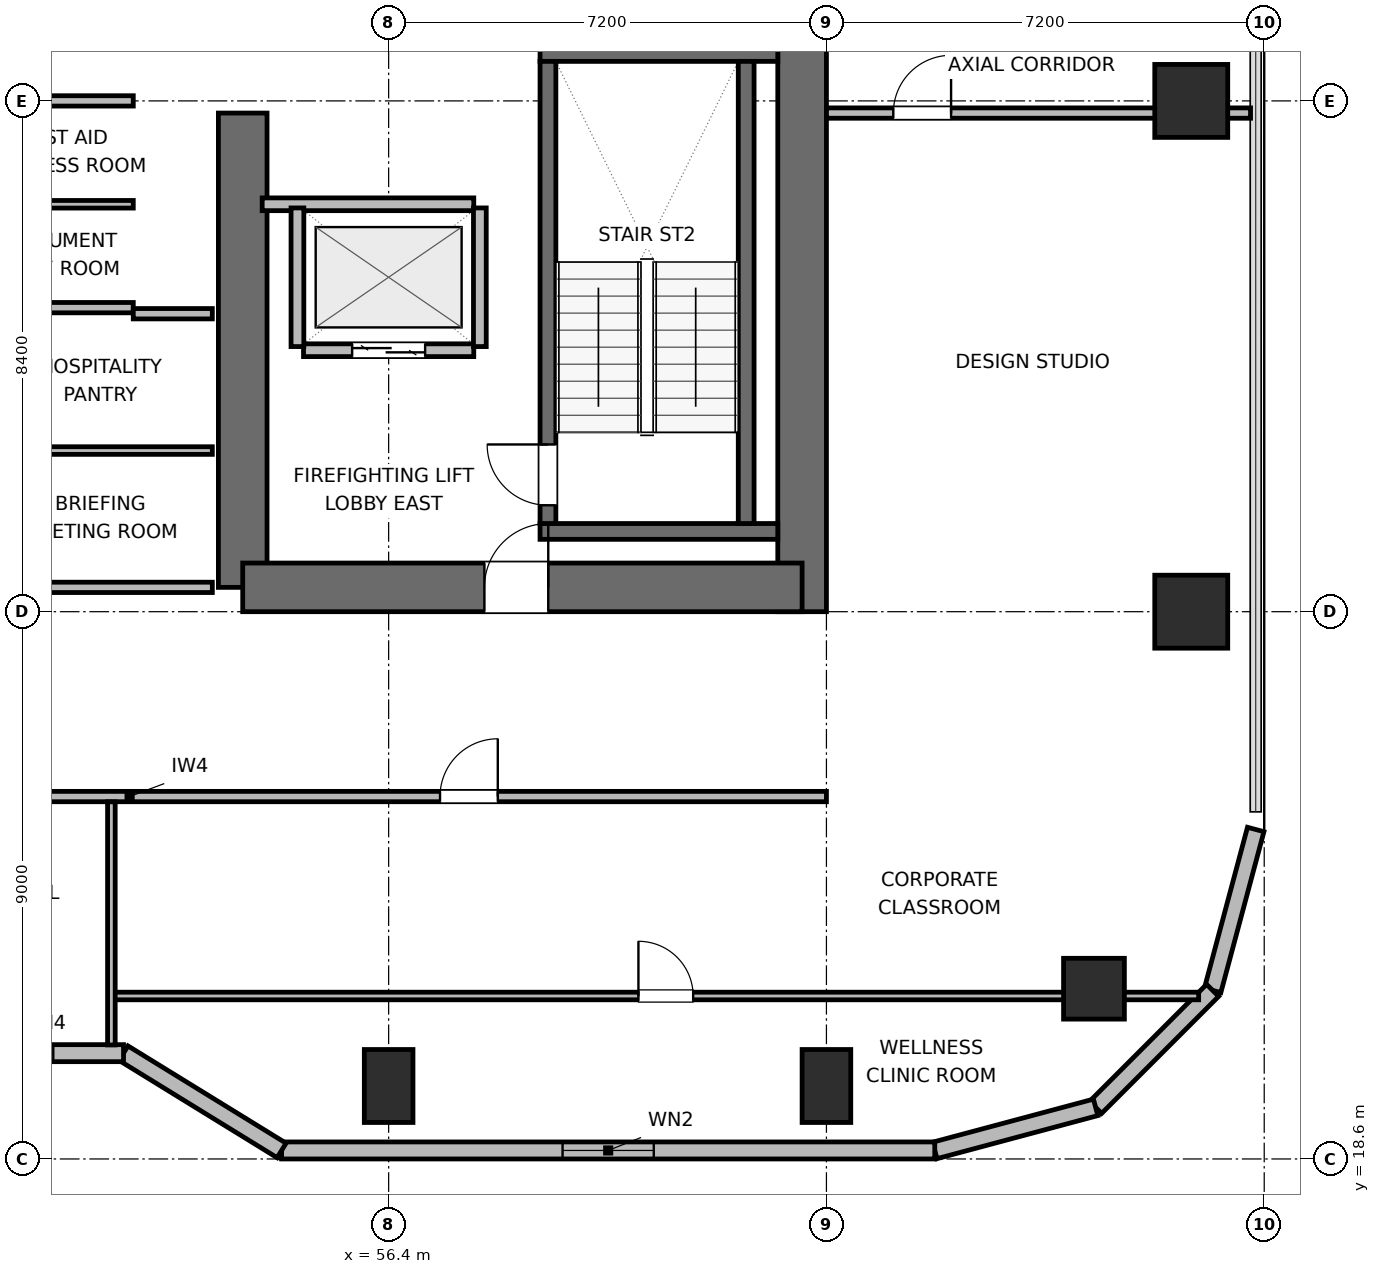
"""IFC4 building model, lengths in metres.
Left out: names, types, materials, properties, quantities, classifications, styles, units other than length and angle.
Written with IfcOpenShell. Run it as: python <this file> out.ifc"""

import sys

from ifc_helpers import new_model, si_unit, direction, frame, frame_2d, origin, origin_2d, place, context, subcontext, project, spatial, rectangle, circle, extrude, element, fill, save


model = new_model("IFC4")
c1 = context("Model", 3, precision=1e-05, world=origin(), true_north=direction((0.0, 1.0)))
c2 = subcontext(c1, "Body", "Model", "MODEL_VIEW")
j1 = project(units=[si_unit("LENGTHUNIT", "METRE"), si_unit("PLANEANGLEUNIT", "RADIAN")], contexts=[c1])
p1 = place(None, origin())
s1 = spatial("IfcSite", under=j1, at=p1, CompositionType="ELEMENT")
p2 = place(p1, origin())
s2 = spatial("IfcBuilding", under=s1, at=p2, CompositionType="ELEMENT")
p3 = place(p2, frame((0.0, 0.0, 177.9)))
s3 = spatial("IfcBuildingStorey", under=s2, at=p3, CompositionType="ELEMENT", Elevation=177.9)
p4 = place(p3, frame((54.0, 28.0, 0.0), z_axis=(0.0, 0.0, 1.0), x_axis=(0.0, 1.0, 0.0)))
e1 = element("IfcWall", 1, at=p4, inside=s3, PredefinedType="SHEAR", context=c2, shape_type="SweptSolid", body=[
    extrude(rectangle(XDim=7.8, YDim=0.8, at=frame_2d((3.9, 0.0))), origin(), (0.0, 0.0, 1.0), 3.9),
])
p5 = place(p3, frame((63.2, 27.6, 0.0), z_axis=(0.0, 0.0, 1.0), x_axis=(0.0, 1.0, 0.0)))
e2 = element("IfcWall", 2, at=p5, inside=s3, PredefinedType="SHEAR", context=c2, shape_type="SweptSolid", body=[
    extrude(rectangle(XDim=16.8, YDim=0.8, at=frame_2d((8.4, 0.0))), origin(), (0.0, 0.0, 1.0), 3.9),
])
p6 = place(p3, frame((54.0, 28.0, 0.0), z_axis=(0.0, 0.0, 1.0), x_axis=(1.0, 0.0, 0.0)))
e3 = element("IfcWall", 3, at=p6, inside=s3, PredefinedType="SHEAR", context=c2, shape_type="SweptSolid", body=[
    extrude(rectangle(XDim=9.2, YDim=0.8, at=frame_2d((4.6, 0.0))), origin(), (0.0, 0.0, 1.0), 3.9),
])
p7 = place(p6, frame((3.975, 0.0, 0.0)))
e4 = element("IfcOpeningElement", 4, at=p7, cuts=e3, PredefinedType="OPENING", context=c2, shape_type="SweptSolid", body=[
    extrude(rectangle(XDim=1.05, YDim=2.04, at=frame_2d((0.525, 1.02))), frame((0.0, 0.41, 0.0), z_axis=(0.0, -1.0, 0.0), x_axis=(1.0, 0.0, 0.0)), (0.0, 0.0, 1.0), 0.82),
])
for number, where, z_axis, x_axis in (
    (5, (58.89, 28.92, 0.0), (0.0, 0.0, 1.0), (1.0, 0.0, 0.0)),
    (6, (58.89, 36.78, 0.0), (0.0, 0.0, 1.0), (1.0, 0.0, 0.0)),
):
    element("IfcWall", number, at=place(p3, frame(where, z_axis=z_axis, x_axis=x_axis)), inside=s3, PredefinedType="SHEAR", context=c2, shape_type="SweptSolid", body=[
        extrude(rectangle(XDim=3.91, YDim=0.26, at=frame_2d((1.955, 0.0))), origin(), (0.0, 0.0, 1.0), 3.9),
    ])
p8 = place(p3, frame((59.02, 29.05, 0.0), z_axis=(0.0, 0.0, 1.0), x_axis=(0.0, 1.0, 0.0)))
e7 = element("IfcWall", 7, at=p8, inside=s3, PredefinedType="SHEAR", context=c2, shape_type="SweptSolid", body=[
    extrude(rectangle(XDim=7.6, YDim=0.26, at=frame_2d((3.8, 0.0))), origin(), (0.0, 0.0, 1.0), 3.9),
])
p9 = place(p8, frame((0.3, 0.0, 0.0)))
e8 = element("IfcOpeningElement", 8, at=p9, cuts=e7, PredefinedType="OPENING", context=c2, shape_type="SweptSolid", body=[
    extrude(rectangle(XDim=1.0, YDim=2.04, at=frame_2d((0.5, 1.02))), frame((0.0, 0.14, 0.0), z_axis=(0.0, -1.0, 0.0), x_axis=(1.0, 0.0, 0.0)), (0.0, 0.0, 1.0), 0.28),
])
p10 = place(p3, frame((62.28, 29.05, 0.0), z_axis=(0.0, 0.0, 1.0), x_axis=(0.0, 1.0, 0.0)))
e9 = element("IfcWall", 9, at=p10, inside=s3, PredefinedType="SHEAR", context=c2, shape_type="SweptSolid", body=[
    extrude(rectangle(XDim=7.6, YDim=0.26, at=frame_2d((3.8, 0.0))), origin(), (0.0, 0.0, 1.0), 3.9),
])
p11 = place(p3, frame((68.0, 21.4, 0.0), z_axis=(0.0, 0.0, 1.0), x_axis=(1.0, 0.0, 0.0)))
e10 = element("IfcColumn", 10, at=p11, inside=s3, PredefinedType="COLUMN", context=c2, shape_type="SweptSolid", body=[
    extrude(circle(Radius=0.5, at=origin_2d()), origin(), (0.0, 0.0, 1.0), 3.9),
])
for number, where, z_axis, x_axis in (
    (11, (56.4, 19.8, 0.0), (0.0, 0.0, 1.0), (1.0, 0.0, 0.0)),
    (12, (63.6, 19.8, 0.0), (0.0, 0.0, 1.0), (1.0, 0.0, 0.0)),
):
    element("IfcColumn", number, at=place(p3, frame(where, z_axis=z_axis, x_axis=x_axis)), inside=s3, PredefinedType="COLUMN", context=c2, shape_type="SweptSolid", body=[
        extrude(rectangle(XDim=0.8, YDim=1.2, at=origin_2d()), origin(), (0.0, 0.0, 1.0), 3.9),
    ])
for number, where, z_axis, x_axis in (
    (13, (69.6, 27.6, 0.0), (0.0, 0.0, 1.0), (1.0, 0.0, 0.0)),
    (14, (69.6, 36.0, 0.0), (0.0, 0.0, 1.0), (1.0, 0.0, 0.0)),
):
    element("IfcColumn", number, at=place(p3, frame(where, z_axis=z_axis, x_axis=x_axis)), inside=s3, PredefinedType="COLUMN", context=c2, shape_type="SweptSolid", body=[
        extrude(rectangle(XDim=1.2, YDim=1.2, at=origin_2d()), origin(), (0.0, 0.0, 1.0), 3.9),
    ])
p12 = place(p3, frame((70.66, 24.018, 0.0), z_axis=(0.0, 0.0, 1.0), x_axis=(-0.258672222976, -0.9659651552, 0.0)))
e15 = element("IfcWall", 15, at=p12, inside=s3, PredefinedType="SOLIDWALL", context=c2, shape_type="SweptSolid", body=[
    extrude(rectangle(XDim=2.739, YDim=0.28, at=frame_2d((1.37, 0.0))), origin(), (0.0, 0.0, 1.0), 3.68),
])
p13 = place(p3, frame((69.951, 21.373, 0.0), z_axis=(0.0, 0.0, 1.0), x_axis=(-0.707061915429, -0.707151644098, 0.0)))
e16 = element("IfcWall", 16, at=p13, inside=s3, PredefinedType="SOLIDWALL", context=c2, shape_type="SweptSolid", body=[
    extrude(rectangle(XDim=2.721, YDim=0.28, at=frame_2d((1.36, 0.0))), origin(), (0.0, 0.0, 1.0), 3.68),
])
p14 = place(p3, frame((68.028, 19.448, 0.0), z_axis=(0.0, 0.0, 1.0), x_axis=(-0.965971118627, -0.258649952598, 0.0)))
e17 = element("IfcWall", 17, at=p14, inside=s3, PredefinedType="SOLIDWALL", context=c2, shape_type="SweptSolid", body=[
    extrude(rectangle(XDim=2.739, YDim=0.28, at=frame_2d((1.37, 0.0))), origin(), (0.0, 0.0, 1.0), 3.68),
])
p15 = place(p3, frame((65.382, 18.74, 0.0), z_axis=(0.0, 0.0, 1.0), x_axis=(-1.0, 0.0, 0.0)))
e18 = element("IfcWall", 18, at=p15, inside=s3, PredefinedType="SOLIDWALL", context=c2, shape_type="SweptSolid", body=[
    extrude(rectangle(XDim=10.742, YDim=0.28, at=frame_2d((5.371, 0.0))), origin(), (0.0, 0.0, 1.0), 3.68),
])
p16 = place(p15, frame((4.621, 0.0, 0.85)))
e19 = element("IfcOpeningElement", 19, at=p16, cuts=e18, PredefinedType="OPENING", context=c2, shape_type="SweptSolid", body=[
    extrude(rectangle(XDim=1.5, YDim=1.1, at=frame_2d((0.75, 0.55))), frame((0.0, 0.15, 0.0), z_axis=(0.0, -1.0, 0.0), x_axis=(1.0, 0.0, 0.0)), (0.0, 0.0, 1.0), 0.3),
])
p17 = place(p3, frame((54.64, 18.74, 0.0), z_axis=(0.0, 0.0, 1.0), x_axis=(-0.851652825334, 0.524106349037, 0.0)))
e20 = element("IfcWall", 20, at=p17, inside=s3, PredefinedType="SOLIDWALL", context=c2, shape_type="SweptSolid", body=[
    extrude(rectangle(XDim=3.053, YDim=0.28, at=frame_2d((1.526, 0.0))), origin(), (0.0, 0.0, 1.0), 2.265),
])
p18 = place(p3, frame((52.04, 20.34, 0.0), z_axis=(0.0, 0.0, 1.0), x_axis=(-1.0, 0.0, 0.0)))
e21 = element("IfcWall", 21, at=p18, inside=s3, PredefinedType="SOLIDWALL", context=c2, shape_type="SweptSolid", body=[
    extrude(rectangle(XDim=4.699, YDim=0.28, at=frame_2d((2.35, 0.0))), origin(), (0.0, 0.0, 1.0), 2.265),
])
p19 = place(p18, frame((1.155, 0.0, 0.85)))
e22 = element("IfcOpeningElement", 22, at=p19, cuts=e21, PredefinedType="OPENING", context=c2, shape_type="SweptSolid", body=[
    extrude(rectangle(XDim=2.4, YDim=1.15, at=frame_2d((1.2, 0.575))), frame((0.0, 0.15, 0.0), z_axis=(0.0, -1.0, 0.0), x_axis=(1.0, 0.0, 0.0)), (0.0, 0.0, 1.0), 0.3),
])
p20 = place(p3, frame((55.0, 31.9, 0.0), z_axis=(0.0, 0.0, 1.0), x_axis=(1.0, 0.0, 0.0)))
e23 = element("IfcWall", 23, at=p20, inside=s3, PredefinedType="PARTITIONING", context=c2, shape_type="SweptSolid", body=[
    extrude(rectangle(XDim=2.8, YDim=0.21, at=frame_2d((1.4, 0.0))), origin(), (0.0, 0.0, 1.0), 3.68),
])
p21 = place(p20, frame((0.8, 0.0, 0.0)))
e24 = element("IfcOpeningElement", 24, at=p21, cuts=e23, PredefinedType="OPENING", context=c2, shape_type="SweptSolid", body=[
    extrude(rectangle(XDim=1.2, YDim=2.04, at=frame_2d((0.6, 1.02))), frame((0.0, 0.115, 0.0), z_axis=(0.0, -1.0, 0.0), x_axis=(1.0, 0.0, 0.0)), (0.0, 0.0, 1.0), 0.23),
])
p22 = place(p3, frame((54.32, 34.3, 0.0), z_axis=(0.0, 0.0, 1.0), x_axis=(1.0, 0.0, 0.0)))
e25 = element("IfcWall", 25, at=p22, inside=s3, PredefinedType="PARTITIONING", context=c2, shape_type="SweptSolid", body=[
    extrude(rectangle(XDim=3.48, YDim=0.21, at=frame_2d((1.74, 0.0))), origin(), (0.0, 0.0, 1.0), 3.68),
])
for number, where, z_axis, x_axis in (
    (26, (54.9, 31.96, 0.0), (0.0, 0.0, 1.0), (0.0, 1.0, 0.0)),
    (27, (57.9, 31.96, 0.0), (0.0, 0.0, 1.0), (0.0, 1.0, 0.0)),
):
    element("IfcWall", number, at=place(p3, frame(where, z_axis=z_axis, x_axis=x_axis)), inside=s3, PredefinedType="PARTITIONING", context=c2, shape_type="SweptSolid", body=[
        extrude(rectangle(XDim=2.28, YDim=0.21, at=frame_2d((1.14, 0.0))), origin(), (0.0, 0.0, 1.0), 3.68),
    ])
for number, where, z_axis, x_axis in (
    (28, (49.287, 32.6, 0.0), (0.0, 0.0, 1.0), (1.0, 0.0, 0.0)),
    (29, (49.287, 36.0, 0.0), (0.0, 0.0, 1.0), (1.0, 0.0, 0.0)),
):
    element("IfcWall", number, at=place(p3, frame(where, z_axis=z_axis, x_axis=x_axis)), inside=s3, PredefinedType="PARTITIONING", context=c2, shape_type="SweptSolid", body=[
        extrude(rectangle(XDim=2.913, YDim=0.17, at=frame_2d((1.457, 0.0))), origin(), (0.0, 0.0, 1.0), 3.68),
    ])
p23 = place(p3, frame((49.287, 34.3, 0.0), z_axis=(0.0, 0.0, 1.0), x_axis=(1.0, 0.0, 0.0)))
e30 = element("IfcWall", 30, at=p23, inside=s3, PredefinedType="PARTITIONING", context=c2, shape_type="SweptSolid", body=[
    extrude(rectangle(XDim=2.913, YDim=0.125, at=frame_2d((1.457, 0.0))), origin(), (0.0, 0.0, 1.0), 3.68),
])
p24 = place(p3, frame((49.287, 28.0, 0.0), z_axis=(0.0, 0.0, 1.0), x_axis=(1.0, 0.0, 0.0)))
e31 = element("IfcWall", 31, at=p24, inside=s3, PredefinedType="PARTITIONING", context=c2, shape_type="SweptSolid", body=[
    extrude(rectangle(XDim=4.213, YDim=0.17, at=frame_2d((2.106, 0.0))), origin(), (0.0, 0.0, 1.0), 2.765),
])
p25 = place(p3, frame((52.2, 32.5, 0.0), z_axis=(0.0, 0.0, 1.0), x_axis=(1.0, 0.0, 0.0)))
e32 = element("IfcWall", 32, at=p25, inside=s3, PredefinedType="PARTITIONING", context=c2, shape_type="SweptSolid", body=[
    extrude(rectangle(XDim=1.3, YDim=0.17, at=frame_2d((0.65, 0.0))), origin(), (0.0, 0.0, 1.0), 3.68),
])
p26 = place(p3, frame((49.287, 30.25, 0.0), z_axis=(0.0, 0.0, 1.0), x_axis=(1.0, 0.0, 0.0)))
e33 = element("IfcWall", 33, at=p26, inside=s3, PredefinedType="PARTITIONING", context=c2, shape_type="SweptSolid", body=[
    extrude(rectangle(XDim=4.213, YDim=0.125, at=frame_2d((2.106, 0.0))), origin(), (0.0, 0.0, 1.0), 3.68),
])
p27 = place(p3, frame((29.525, 24.56, 0.0), z_axis=(0.0, 0.0, 1.0), x_axis=(1.0, 0.0, 0.0)))
e34 = element("IfcWall", 34, at=p27, inside=s3, PredefinedType="PARTITIONING", context=c2, shape_type="SweptSolid", body=[
    extrude(rectangle(XDim=34.075, YDim=0.17, at=frame_2d((17.038, 0.0))), origin(), (0.0, 0.0, 1.0), 3.68),
])
p28 = place(p27, frame((5.403, 0.0, 0.0)))
e35 = element("IfcOpeningElement", 35, at=p28, cuts=e34, PredefinedType="OPENING", context=c2, shape_type="SweptSolid", body=[
    extrude(rectangle(XDim=0.95, YDim=2.04, at=frame_2d((0.475, 1.02))), frame((0.0, 0.095, 0.0), z_axis=(0.0, -1.0, 0.0), x_axis=(1.0, 0.0, 0.0)), (0.0, 0.0, 1.0), 0.19),
])
p29 = place(p27, frame((16.56, 0.0, 0.0)))
e36 = element("IfcOpeningElement", 36, at=p29, cuts=e34, PredefinedType="OPENING", context=c2, shape_type="SweptSolid", body=[
    extrude(rectangle(XDim=0.95, YDim=2.04, at=frame_2d((0.475, 1.02))), frame((0.0, 0.095, 0.0), z_axis=(0.0, -1.0, 0.0), x_axis=(1.0, 0.0, 0.0)), (0.0, 0.0, 1.0), 0.19),
])
p30 = place(p27, frame((27.72, 0.0, 0.0)))
e37 = element("IfcOpeningElement", 37, at=p30, cuts=e34, PredefinedType="OPENING", context=c2, shape_type="SweptSolid", body=[
    extrude(rectangle(XDim=0.95, YDim=2.04, at=frame_2d((0.475, 1.02))), frame((0.0, 0.095, 0.0), z_axis=(0.0, -1.0, 0.0), x_axis=(1.0, 0.0, 0.0)), (0.0, 0.0, 1.0), 0.19),
])
p31 = place(p3, frame((51.84, 21.28, 0.0), z_axis=(0.0, 0.0, 1.0), x_axis=(1.0, 0.0, 0.0)))
e38 = element("IfcWall", 38, at=p31, inside=s3, PredefinedType="PARTITIONING", context=c2, shape_type="SweptSolid", body=[
    extrude(rectangle(XDim=17.882, YDim=0.125, at=frame_2d((8.941, 0.0))), origin(), (0.0, 0.0, 1.0), 2.265),
])
p32 = place(p31, frame((8.668, 0.0, 0.0)))
e39 = element("IfcOpeningElement", 39, at=p32, cuts=e38, PredefinedType="OPENING", context=c2, shape_type="SweptSolid", body=[
    extrude(rectangle(XDim=0.9, YDim=2.02, at=frame_2d((0.45, 1.01))), frame((0.0, 0.073, 0.0), z_axis=(0.0, -1.0, 0.0), x_axis=(1.0, 0.0, 0.0)), (0.0, 0.0, 1.0), 0.145),
])
p33 = place(p3, frame((51.84, 20.475, 0.0), z_axis=(0.0, 0.0, 1.0), x_axis=(0.0, 1.0, 0.0)))
e40 = element("IfcWall", 40, at=p33, inside=s3, PredefinedType="PARTITIONING", context=c2, shape_type="SweptSolid", body=[
    extrude(rectangle(XDim=3.998, YDim=0.125, at=frame_2d((1.999, 0.0))), origin(), (0.0, 0.0, 1.0), 3.68),
])
p34 = place(p3, frame((63.6, 35.8, 0.0), z_axis=(0.0, 0.0, 1.0), x_axis=(1.0, 0.0, 0.0)))
e41 = element("IfcWall", 41, at=p34, inside=s3, PredefinedType="PARTITIONING", context=c2, shape_type="SweptSolid", body=[
    extrude(rectangle(XDim=6.975, YDim=0.17, at=frame_2d((3.487, 0.0))), origin(), (0.0, 0.0, 1.0), 3.043),
])
p35 = place(p34, frame((1.1, 0.0, 0.0)))
e42 = element("IfcOpeningElement", 42, at=p35, cuts=e41, PredefinedType="OPENING", context=c2, shape_type="SweptSolid", body=[
    extrude(rectangle(XDim=0.95, YDim=2.04, at=frame_2d((0.475, 1.02))), frame((0.0, 0.095, 0.0), z_axis=(0.0, -1.0, 0.0), x_axis=(1.0, 0.0, 0.0)), (0.0, 0.0, 1.0), 0.19),
])
p36 = place(p16, origin())
e43 = element("IfcWindow", 43, at=p36, inside=s3, PartitioningType="SINGLE_PANEL", PredefinedType="WINDOW", context=c2, shape_type="SweptSolid", body=[
    extrude(rectangle(XDim=1.5, YDim=1.1, at=frame_2d((0.75, 0.55))), frame((0.0, 0.03, 0.0), z_axis=(0.0, -1.0, 0.0), x_axis=(1.0, 0.0, 0.0)), (0.0, 0.0, 1.0), 0.06),
])
fill(e19, e43)
p37 = place(p19, origin())
e44 = element("IfcWindow", 44, at=p37, inside=s3, PartitioningType="SINGLE_PANEL", PredefinedType="WINDOW", context=c2, shape_type="SweptSolid", body=[
    extrude(rectangle(XDim=2.4, YDim=1.15, at=frame_2d((1.2, 0.575))), frame((0.0, 0.03, 0.0), z_axis=(0.0, -1.0, 0.0), x_axis=(1.0, 0.0, 0.0)), (0.0, 0.0, 1.0), 0.06),
])
fill(e22, e44)
p38 = place(p9, origin())
e45 = element("IfcDoor", 45, at=p38, inside=s3, OperationType="SINGLE_SWING_RIGHT", PredefinedType="DOOR", context=c2, shape_type="SweptSolid", body=[
    extrude(rectangle(XDim=1.0, YDim=2.04, at=frame_2d((0.5, 1.02))), frame((0.0, 0.025, 0.0), z_axis=(0.0, -1.0, 0.0), x_axis=(1.0, 0.0, 0.0)), (0.0, 0.0, 1.0), 0.05),
])
fill(e8, e45)
p39 = place(p21, origin())
e46 = element("IfcDoor", 46, at=p39, inside=s3, OperationType="DOUBLE_DOOR_SLIDING", PredefinedType="DOOR", context=c2, shape_type="SweptSolid", body=[
    extrude(rectangle(XDim=1.2, YDim=2.04, at=frame_2d((0.6, 1.02))), frame((0.0, 0.025, 0.0), z_axis=(0.0, -1.0, 0.0), x_axis=(1.0, 0.0, 0.0)), (0.0, 0.0, 1.0), 0.05),
])
fill(e24, e46)
p40 = place(p7, origin())
e47 = element("IfcDoor", 47, at=p40, inside=s3, OperationType="SINGLE_SWING_RIGHT", PredefinedType="DOOR", context=c2, shape_type="SweptSolid", body=[
    extrude(rectangle(XDim=1.05, YDim=2.04, at=frame_2d((0.525, 1.02))), frame((0.0, 0.025, 0.0), z_axis=(0.0, -1.0, 0.0), x_axis=(1.0, 0.0, 0.0)), (0.0, 0.0, 1.0), 0.05),
])
fill(e4, e47)
p41 = place(p32, origin())
e48 = element("IfcDoor", 48, at=p41, inside=s3, OperationType="SINGLE_SWING_LEFT", PredefinedType="DOOR", context=c2, shape_type="SweptSolid", body=[
    extrude(rectangle(XDim=0.9, YDim=2.02, at=frame_2d((0.45, 1.01))), frame((0.0, 0.025, 0.0), z_axis=(0.0, -1.0, 0.0), x_axis=(1.0, 0.0, 0.0)), (0.0, 0.0, 1.0), 0.05),
])
fill(e39, e48)
p42 = place(p30, origin())
e49 = element("IfcDoor", 49, at=p42, inside=s3, OperationType="SINGLE_SWING_RIGHT", PredefinedType="DOOR", context=c2, shape_type="SweptSolid", body=[
    extrude(rectangle(XDim=0.95, YDim=2.04, at=frame_2d((0.475, 1.02))), frame((0.0, 0.025, 0.0), z_axis=(0.0, -1.0, 0.0), x_axis=(1.0, 0.0, 0.0)), (0.0, 0.0, 1.0), 0.05),
])
fill(e37, e49)
p43 = place(p35, origin())
e50 = element("IfcDoor", 50, at=p43, inside=s3, OperationType="SINGLE_SWING_RIGHT", PredefinedType="DOOR", context=c2, shape_type="SweptSolid", body=[
    extrude(rectangle(XDim=0.95, YDim=2.04, at=frame_2d((0.475, 1.02))), frame((0.0, 0.025, 0.0), z_axis=(0.0, -1.0, 0.0), x_axis=(1.0, 0.0, 0.0)), (0.0, 0.0, 1.0), 0.05),
])
fill(e42, e50)
save(model, sys.argv[1])
